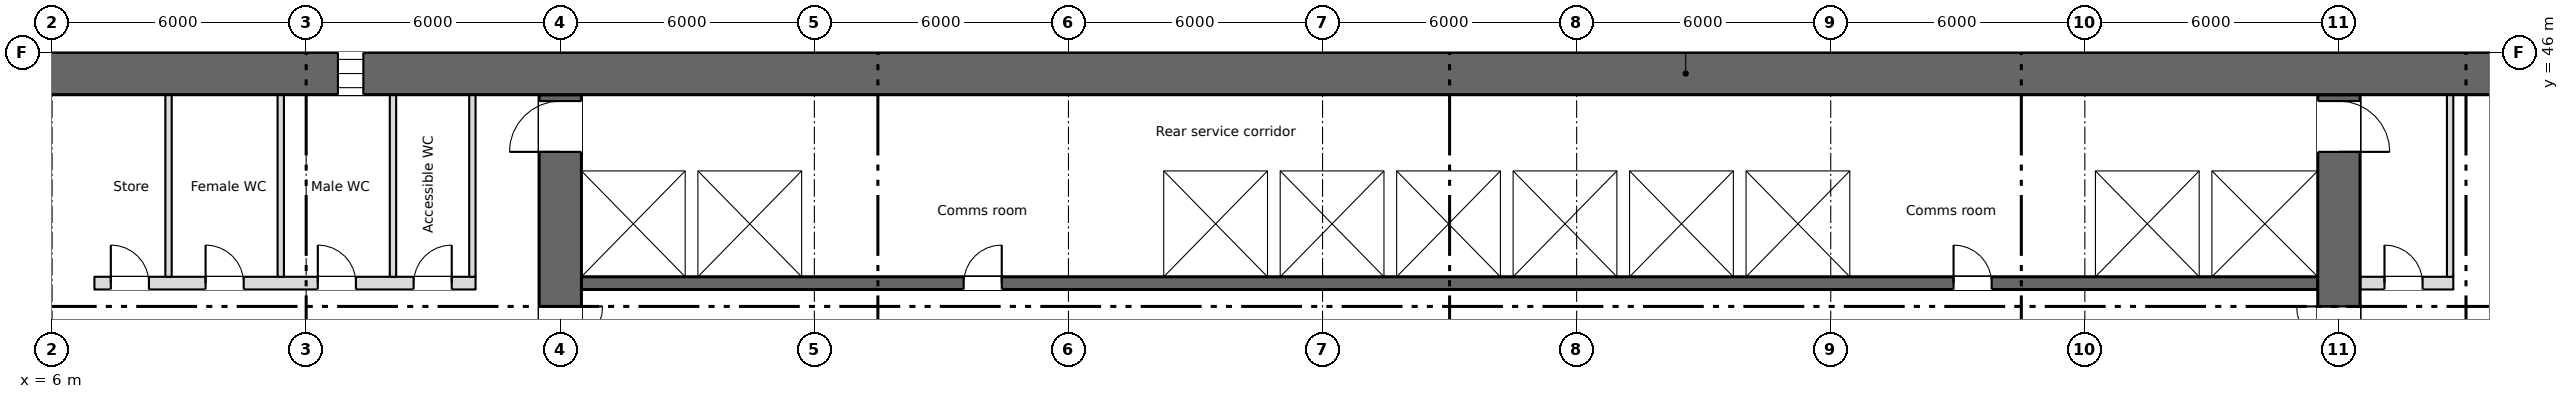
"""IFC4 building model, lengths in metres.
Left out: names, types, materials, properties, quantities, classifications, styles, units other than length and angle.
Written with IfcOpenShell. Run it as: python <this file> out.ifc"""

import sys

from ifc_helpers import new_model, si_unit, direction, frame, frame_2d, origin, place, context, subcontext, project, spatial, rectangle, extrude, element, fill, save


model = new_model("IFC4")
c1 = context("Model", 3, precision=1e-05, world=origin(), true_north=direction((0.0, 1.0)))
c2 = subcontext(c1, "Body", "Model", "MODEL_VIEW")
j1 = project(units=[si_unit("LENGTHUNIT", "METRE"), si_unit("PLANEANGLEUNIT", "RADIAN")], contexts=[c1])
p1 = place(None, origin())
s1 = spatial("IfcSite", under=j1, at=p1, CompositionType="ELEMENT")
p2 = place(p1, origin())
s2 = spatial("IfcBuilding", under=s1, at=p2, CompositionType="ELEMENT")
p3 = place(p2, frame((0.0, 0.0, 37.5)))
s3 = spatial("IfcBuildingStorey", under=s2, at=p3, CompositionType="ELEMENT", Elevation=37.5)
p4 = place(p3, frame((5.55, 45.5, 0.0), z_axis=(0.0, 0.0, 1.0), x_axis=(1.0, 0.0, 0.0)))
e1 = element("IfcWall", 1, at=p4, inside=s3, PredefinedType="SHEAR", context=c2, shape_type="SweptSolid", body=[
    extrude(rectangle(XDim=66.9, YDim=1.0, at=frame_2d((33.45, 0.0))), origin(), (0.0, 0.0, 1.0), 3.35),
])
p5 = place(p4, frame((7.2, 0.0, 0.6)))
e2 = element("IfcOpeningElement", 2, at=p5, cuts=e1, PredefinedType="OPENING", context=c2, shape_type="SweptSolid", body=[
    extrude(rectangle(XDim=0.6, YDim=2.4, at=frame_2d((0.3, 1.2))), frame((0.0, 0.51, 0.0), z_axis=(0.0, -1.0, 0.0), x_axis=(1.0, 0.0, 0.0)), (0.0, 0.0, 1.0), 1.02),
])
p6 = place(p4, frame((61.2, 0.0, 0.6)))
e3 = element("IfcOpeningElement", 3, at=p6, cuts=e1, PredefinedType="OPENING", context=c2, shape_type="SweptSolid", body=[
    extrude(rectangle(XDim=0.6, YDim=2.4, at=frame_2d((0.3, 1.2))), frame((0.0, 0.51, 0.0), z_axis=(0.0, -1.0, 0.0), x_axis=(1.0, 0.0, 0.0)), (0.0, 0.0, 1.0), 1.02),
])
p7 = place(p3, frame((6.85, 28.4, 0.0), z_axis=(0.0, 0.0, 1.0), x_axis=(0.0, 1.0, 0.0)))
e4 = element("IfcWall", 4, at=p7, inside=s3, PredefinedType="SHEAR", context=c2, shape_type="SweptSolid", body=[
    extrude(rectangle(XDim=16.6, YDim=0.3, at=frame_2d((8.3, 0.0))), origin(), (0.0, 0.0, 1.0), 3.35),
])
p8 = place(p3, frame((18.0, 28.4, 0.0), z_axis=(0.0, 0.0, 1.0), x_axis=(0.0, 1.0, 0.0)))
e5 = element("IfcWall", 5, at=p8, inside=s3, PredefinedType="SHEAR", context=c2, shape_type="SweptSolid", body=[
    extrude(rectangle(XDim=16.6, YDim=1.0, at=frame_2d((8.3, 0.0))), origin(), (0.0, 0.0, 1.0), 3.35),
])
p9 = place(p8, frame((9.6, 0.0, 0.0)))
e6 = element("IfcOpeningElement", 6, at=p9, cuts=e5, PredefinedType="OPENING", context=c2, shape_type="SweptSolid", body=[
    extrude(rectangle(XDim=2.0, YDim=2.1, at=frame_2d((1.0, 1.05))), frame((0.0, 0.51, 0.0), z_axis=(0.0, -1.0, 0.0), x_axis=(1.0, 0.0, 0.0)), (0.0, 0.0, 1.0), 1.02),
])
p10 = place(p8, frame((15.25, 0.0, 0.0)))
e7 = element("IfcOpeningElement", 7, at=p10, cuts=e5, PredefinedType="OPENING", context=c2, shape_type="SweptSolid", body=[
    extrude(rectangle(XDim=1.2, YDim=2.1, at=frame_2d((0.6, 1.05))), frame((0.0, 0.51, 0.0), z_axis=(0.0, -1.0, 0.0), x_axis=(1.0, 0.0, 0.0)), (0.0, 0.0, 1.0), 1.02),
])
p11 = place(p3, frame((60.0, 28.4, 0.0), z_axis=(0.0, 0.0, 1.0), x_axis=(0.0, 1.0, 0.0)))
e8 = element("IfcWall", 8, at=p11, inside=s3, PredefinedType="SHEAR", context=c2, shape_type="SweptSolid", body=[
    extrude(rectangle(XDim=16.6, YDim=1.0, at=frame_2d((8.3, 0.0))), origin(), (0.0, 0.0, 1.0), 3.35),
])
p12 = place(p11, frame((9.6, 0.0, 0.0)))
e9 = element("IfcOpeningElement", 9, at=p12, cuts=e8, PredefinedType="OPENING", context=c2, shape_type="SweptSolid", body=[
    extrude(rectangle(XDim=2.0, YDim=2.1, at=frame_2d((1.0, 1.05))), frame((0.0, 0.51, 0.0), z_axis=(0.0, -1.0, 0.0), x_axis=(1.0, 0.0, 0.0)), (0.0, 0.0, 1.0), 1.02),
])
p13 = place(p11, frame((15.25, 0.0, 0.0)))
e10 = element("IfcOpeningElement", 10, at=p13, cuts=e8, PredefinedType="OPENING", context=c2, shape_type="SweptSolid", body=[
    extrude(rectangle(XDim=1.2, YDim=2.1, at=frame_2d((0.6, 1.05))), frame((0.0, 0.51, 0.0), z_axis=(0.0, -1.0, 0.0), x_axis=(1.0, 0.0, 0.0)), (0.0, 0.0, 1.0), 1.02),
])
p14 = place(p3, frame((18.5, 40.55, 0.0), z_axis=(0.0, 0.0, 1.0), x_axis=(1.0, 0.0, 0.0)))
e11 = element("IfcWall", 11, at=p14, inside=s3, PredefinedType="SHEAR", context=c2, shape_type="SweptSolid", body=[
    extrude(rectangle(XDim=41.0, YDim=0.3, at=frame_2d((20.5, 0.0))), origin(), (0.0, 0.0, 1.0), 3.35),
])
p15 = place(p14, frame((9.025, 0.0, 0.0)))
e12 = element("IfcOpeningElement", 12, at=p15, cuts=e11, PredefinedType="OPENING", context=c2, shape_type="SweptSolid", body=[
    extrude(rectangle(XDim=0.9, YDim=2.1, at=frame_2d((0.45, 1.05))), frame((0.0, 0.16, 0.0), z_axis=(0.0, -1.0, 0.0), x_axis=(1.0, 0.0, 0.0)), (0.0, 0.0, 1.0), 0.32),
])
p16 = place(p14, frame((32.4, 0.0, 0.0)))
e13 = element("IfcOpeningElement", 13, at=p16, cuts=e11, PredefinedType="OPENING", context=c2, shape_type="SweptSolid", body=[
    extrude(rectangle(XDim=0.9, YDim=2.1, at=frame_2d((0.45, 1.05))), frame((0.0, 0.16, 0.0), z_axis=(0.0, -1.0, 0.0), x_axis=(1.0, 0.0, 0.0)), (0.0, 0.0, 1.0), 0.32),
])
p17 = place(p14, frame((14.425, 0.0, 0.0)))
e14 = element("IfcOpeningElement", 14, at=p17, cuts=e11, PredefinedType="OPENING", context=c2, shape_type="SweptSolid", body=[
    extrude(rectangle(XDim=1.1, YDim=2.1, at=frame_2d((0.55, 1.05))), frame((0.0, 0.16, 0.0), z_axis=(0.0, -1.0, 0.0), x_axis=(1.0, 0.0, 0.0)), (0.0, 0.0, 1.0), 0.32),
])
p18 = place(p14, frame((17.175, 0.0, 0.0)))
e15 = element("IfcOpeningElement", 15, at=p18, cuts=e11, PredefinedType="OPENING", context=c2, shape_type="SweptSolid", body=[
    extrude(rectangle(XDim=1.1, YDim=2.1, at=frame_2d((0.55, 1.05))), frame((0.0, 0.16, 0.0), z_axis=(0.0, -1.0, 0.0), x_axis=(1.0, 0.0, 0.0)), (0.0, 0.0, 1.0), 0.32),
])
p19 = place(p14, frame((19.925, 0.0, 0.0)))
e16 = element("IfcOpeningElement", 16, at=p19, cuts=e11, PredefinedType="OPENING", context=c2, shape_type="SweptSolid", body=[
    extrude(rectangle(XDim=1.1, YDim=2.1, at=frame_2d((0.55, 1.05))), frame((0.0, 0.16, 0.0), z_axis=(0.0, -1.0, 0.0), x_axis=(1.0, 0.0, 0.0)), (0.0, 0.0, 1.0), 0.32),
])
p20 = place(p14, frame((22.675, 0.0, 0.0)))
e17 = element("IfcOpeningElement", 17, at=p20, cuts=e11, PredefinedType="OPENING", context=c2, shape_type="SweptSolid", body=[
    extrude(rectangle(XDim=1.1, YDim=2.1, at=frame_2d((0.55, 1.05))), frame((0.0, 0.16, 0.0), z_axis=(0.0, -1.0, 0.0), x_axis=(1.0, 0.0, 0.0)), (0.0, 0.0, 1.0), 0.32),
])
p21 = place(p14, frame((36.375, 0.0, 0.0)))
e18 = element("IfcOpeningElement", 18, at=p21, cuts=e11, PredefinedType="OPENING", context=c2, shape_type="SweptSolid", body=[
    extrude(rectangle(XDim=1.2, YDim=2.1, at=frame_2d((0.6, 1.05))), frame((0.0, 0.16, 0.0), z_axis=(0.0, -1.0, 0.0), x_axis=(1.0, 0.0, 0.0)), (0.0, 0.0, 1.0), 0.32),
])
p22 = place(p14, frame((39.15, 0.0, 0.0)))
e19 = element("IfcOpeningElement", 19, at=p22, cuts=e11, PredefinedType="OPENING", context=c2, shape_type="SweptSolid", body=[
    extrude(rectangle(XDim=1.2, YDim=2.1, at=frame_2d((0.6, 1.05))), frame((0.0, 0.16, 0.0), z_axis=(0.0, -1.0, 0.0), x_axis=(1.0, 0.0, 0.0)), (0.0, 0.0, 1.0), 0.32),
])
p23 = place(p3, frame((18.5, 43.35, 0.0), z_axis=(0.0, 0.0, 1.0), x_axis=(1.0, 0.0, 0.0)))
e20 = element("IfcWall", 20, at=p23, inside=s3, PredefinedType="SHEAR", context=c2, shape_type="SweptSolid", body=[
    extrude(rectangle(XDim=41.0, YDim=0.3, at=frame_2d((20.5, 0.0))), origin(), (0.0, 0.0, 1.0), 3.35),
])
p24 = place(p3, frame((7.0, 40.55, 0.0), z_axis=(0.0, 0.0, 1.0), x_axis=(1.0, 0.0, 0.0)))
e21 = element("IfcWall", 21, at=p24, inside=s3, PredefinedType="PARTITIONING", context=c2, shape_type="SweptSolid", body=[
    extrude(rectangle(XDim=9.0, YDim=0.3, at=frame_2d((4.5, 0.0))), origin(), (0.0, 0.0, 1.0), 3.35),
])
p25 = place(p24, frame((0.387, 0.0, 0.0)))
e22 = element("IfcOpeningElement", 22, at=p25, cuts=e21, PredefinedType="OPENING", context=c2, shape_type="SweptSolid", body=[
    extrude(rectangle(XDim=0.9, YDim=2.1, at=frame_2d((0.45, 1.05))), frame((0.0, 0.16, 0.0), z_axis=(0.0, -1.0, 0.0), x_axis=(1.0, 0.0, 0.0)), (0.0, 0.0, 1.0), 0.32),
])
p26 = place(p24, frame((2.625, 0.0, 0.0)))
e23 = element("IfcOpeningElement", 23, at=p26, cuts=e21, PredefinedType="OPENING", context=c2, shape_type="SweptSolid", body=[
    extrude(rectangle(XDim=0.9, YDim=2.1, at=frame_2d((0.45, 1.05))), frame((0.0, 0.16, 0.0), z_axis=(0.0, -1.0, 0.0), x_axis=(1.0, 0.0, 0.0)), (0.0, 0.0, 1.0), 0.32),
])
p27 = place(p24, frame((5.275, 0.0, 0.0)))
e24 = element("IfcOpeningElement", 24, at=p27, cuts=e21, PredefinedType="OPENING", context=c2, shape_type="SweptSolid", body=[
    extrude(rectangle(XDim=0.9, YDim=2.1, at=frame_2d((0.45, 1.05))), frame((0.0, 0.16, 0.0), z_axis=(0.0, -1.0, 0.0), x_axis=(1.0, 0.0, 0.0)), (0.0, 0.0, 1.0), 0.32),
])
p28 = place(p24, frame((7.538, 0.0, 0.0)))
e25 = element("IfcOpeningElement", 25, at=p28, cuts=e21, PredefinedType="OPENING", context=c2, shape_type="SweptSolid", body=[
    extrude(rectangle(XDim=0.9, YDim=2.1, at=frame_2d((0.45, 1.05))), frame((0.0, 0.16, 0.0), z_axis=(0.0, -1.0, 0.0), x_axis=(1.0, 0.0, 0.0)), (0.0, 0.0, 1.0), 0.32),
])
p29 = place(p3, frame((60.5, 40.55, 0.0), z_axis=(0.0, 0.0, 1.0), x_axis=(1.0, 0.0, 0.0)))
e26 = element("IfcWall", 26, at=p29, inside=s3, PredefinedType="PARTITIONING", context=c2, shape_type="SweptSolid", body=[
    extrude(rectangle(XDim=2.2, YDim=0.3, at=frame_2d((1.1, 0.0))), origin(), (0.0, 0.0, 1.0), 3.35),
])
p30 = place(p29, frame((0.575, 0.0, 0.0)))
e27 = element("IfcOpeningElement", 27, at=p30, cuts=e26, PredefinedType="OPENING", context=c2, shape_type="SweptSolid", body=[
    extrude(rectangle(XDim=0.9, YDim=2.1, at=frame_2d((0.45, 1.05))), frame((0.0, 0.16, 0.0), z_axis=(0.0, -1.0, 0.0), x_axis=(1.0, 0.0, 0.0)), (0.0, 0.0, 1.0), 0.32),
])
for number, where, z_axis, x_axis in (
    (28, (21.1, 40.7, 0.0), (0.0, 0.0, 1.0), (0.0, 1.0, 0.0)),
    (29, (23.85, 40.7, 0.0), (0.0, 0.0, 1.0), (0.0, 1.0, 0.0)),
    (30, (32.1, 40.7, 0.0), (0.0, 0.0, 1.0), (0.0, 1.0, 0.0)),
    (31, (34.85, 40.7, 0.0), (0.0, 0.0, 1.0), (0.0, 1.0, 0.0)),
    (32, (37.6, 40.7, 0.0), (0.0, 0.0, 1.0), (0.0, 1.0, 0.0)),
    (33, (40.35, 40.7, 0.0), (0.0, 0.0, 1.0), (0.0, 1.0, 0.0)),
    (34, (43.1, 40.7, 0.0), (0.0, 0.0, 1.0), (0.0, 1.0, 0.0)),
    (35, (45.85, 40.7, 0.0), (0.0, 0.0, 1.0), (0.0, 1.0, 0.0)),
    (36, (48.6, 40.7, 0.0), (0.0, 0.0, 1.0), (0.0, 1.0, 0.0)),
    (37, (54.1, 40.7, 0.0), (0.0, 0.0, 1.0), (0.0, 1.0, 0.0)),
    (38, (56.85, 40.7, 0.0), (0.0, 0.0, 1.0), (0.0, 1.0, 0.0)),
):
    element("IfcWall", number, at=place(p3, frame(where, z_axis=z_axis, x_axis=x_axis)), inside=s3, PredefinedType="SHEAR", context=c2, shape_type="SweptSolid", body=[
        extrude(rectangle(XDim=2.5, YDim=0.3, at=frame_2d((1.25, 0.0))), origin(), (0.0, 0.0, 1.0), 3.35),
    ])
for number, where, z_axis, x_axis in (
    (39, (15.925, 40.7, 0.0), (0.0, 0.0, 1.0), (0.0, 1.0, 0.0)),
    (40, (62.625, 40.7, 0.0), (0.0, 0.0, 1.0), (0.0, 1.0, 0.0)),
    (41, (8.75, 40.7, 0.0), (0.0, 0.0, 1.0), (0.0, 1.0, 0.0)),
    (42, (11.4, 40.7, 0.0), (0.0, 0.0, 1.0), (0.0, 1.0, 0.0)),
    (43, (14.05, 40.7, 0.0), (0.0, 0.0, 1.0), (0.0, 1.0, 0.0)),
):
    element("IfcWall", number, at=place(p3, frame(where, z_axis=z_axis, x_axis=x_axis)), inside=s3, PredefinedType="PARTITIONING", context=c2, shape_type="SweptSolid", body=[
        extrude(rectangle(XDim=4.3, YDim=0.15, at=frame_2d((2.15, 0.0))), origin(), (0.0, 0.0, 1.0), 3.35),
    ])
p31 = place(p5, origin())
e44 = element("IfcWindow", 44, at=p31, inside=s3, PartitioningType="SINGLE_PANEL", PredefinedType="WINDOW", context=c2, shape_type="SweptSolid", body=[
    extrude(rectangle(XDim=0.6, YDim=2.4, at=frame_2d((0.3, 1.2))), frame((0.0, 0.03, 0.0), z_axis=(0.0, -1.0, 0.0), x_axis=(1.0, 0.0, 0.0)), (0.0, 0.0, 1.0), 0.06),
])
fill(e2, e44)
p32 = place(p25, origin())
e45 = element("IfcDoor", 45, at=p32, inside=s3, OperationType="SINGLE_SWING_LEFT", PredefinedType="DOOR", context=c2, shape_type="SweptSolid", body=[
    extrude(rectangle(XDim=0.9, YDim=2.1, at=frame_2d((0.45, 1.05))), frame((0.0, 0.025, 0.0), z_axis=(0.0, -1.0, 0.0), x_axis=(1.0, 0.0, 0.0)), (0.0, 0.0, 1.0), 0.05),
])
fill(e22, e45)
p33 = place(p26, origin())
e46 = element("IfcDoor", 46, at=p33, inside=s3, OperationType="SINGLE_SWING_LEFT", PredefinedType="DOOR", context=c2, shape_type="SweptSolid", body=[
    extrude(rectangle(XDim=0.9, YDim=2.1, at=frame_2d((0.45, 1.05))), frame((0.0, 0.025, 0.0), z_axis=(0.0, -1.0, 0.0), x_axis=(1.0, 0.0, 0.0)), (0.0, 0.0, 1.0), 0.05),
])
fill(e23, e46)
p34 = place(p27, origin())
e47 = element("IfcDoor", 47, at=p34, inside=s3, OperationType="SINGLE_SWING_LEFT", PredefinedType="DOOR", context=c2, shape_type="SweptSolid", body=[
    extrude(rectangle(XDim=0.9, YDim=2.1, at=frame_2d((0.45, 1.05))), frame((0.0, 0.025, 0.0), z_axis=(0.0, -1.0, 0.0), x_axis=(1.0, 0.0, 0.0)), (0.0, 0.0, 1.0), 0.05),
])
fill(e24, e47)
p35 = place(p28, origin())
e48 = element("IfcDoor", 48, at=p35, inside=s3, OperationType="SINGLE_SWING_RIGHT", PredefinedType="DOOR", context=c2, shape_type="SweptSolid", body=[
    extrude(rectangle(XDim=0.9, YDim=2.1, at=frame_2d((0.45, 1.05))), frame((0.0, 0.025, 0.0), z_axis=(0.0, -1.0, 0.0), x_axis=(1.0, 0.0, 0.0)), (0.0, 0.0, 1.0), 0.05),
])
fill(e25, e48)
p36 = place(p30, origin())
e49 = element("IfcDoor", 49, at=p36, inside=s3, OperationType="SINGLE_SWING_LEFT", PredefinedType="DOOR", context=c2, shape_type="SweptSolid", body=[
    extrude(rectangle(XDim=0.9, YDim=2.1, at=frame_2d((0.45, 1.05))), frame((0.0, 0.025, 0.0), z_axis=(0.0, -1.0, 0.0), x_axis=(1.0, 0.0, 0.0)), (0.0, 0.0, 1.0), 0.05),
])
fill(e27, e49)
p37 = place(p15, origin())
e50 = element("IfcDoor", 50, at=p37, inside=s3, OperationType="SINGLE_SWING_RIGHT", PredefinedType="DOOR", context=c2, shape_type="SweptSolid", body=[
    extrude(rectangle(XDim=0.9, YDim=2.1, at=frame_2d((0.45, 1.05))), frame((0.0, 0.025, 0.0), z_axis=(0.0, -1.0, 0.0), x_axis=(1.0, 0.0, 0.0)), (0.0, 0.0, 1.0), 0.05),
])
fill(e12, e50)
p38 = place(p16, origin())
e51 = element("IfcDoor", 51, at=p38, inside=s3, OperationType="SINGLE_SWING_LEFT", PredefinedType="DOOR", context=c2, shape_type="SweptSolid", body=[
    extrude(rectangle(XDim=0.9, YDim=2.1, at=frame_2d((0.45, 1.05))), frame((0.0, 0.025, 0.0), z_axis=(0.0, -1.0, 0.0), x_axis=(1.0, 0.0, 0.0)), (0.0, 0.0, 1.0), 0.05),
])
fill(e13, e51)
p39 = place(p17, origin())
e52 = element("IfcDoor", 52, at=p39, inside=s3, OperationType="SLIDING_TO_LEFT", PredefinedType="DOOR", context=c2, shape_type="SweptSolid", body=[
    extrude(rectangle(XDim=1.1, YDim=2.1, at=frame_2d((0.55, 1.05))), frame((0.0, 0.025, 0.0), z_axis=(0.0, -1.0, 0.0), x_axis=(1.0, 0.0, 0.0)), (0.0, 0.0, 1.0), 0.05),
])
fill(e14, e52)
p40 = place(p18, origin())
e53 = element("IfcDoor", 53, at=p40, inside=s3, OperationType="SLIDING_TO_LEFT", PredefinedType="DOOR", context=c2, shape_type="SweptSolid", body=[
    extrude(rectangle(XDim=1.1, YDim=2.1, at=frame_2d((0.55, 1.05))), frame((0.0, 0.025, 0.0), z_axis=(0.0, -1.0, 0.0), x_axis=(1.0, 0.0, 0.0)), (0.0, 0.0, 1.0), 0.05),
])
fill(e15, e53)
p41 = place(p19, origin())
e54 = element("IfcDoor", 54, at=p41, inside=s3, OperationType="SLIDING_TO_LEFT", PredefinedType="DOOR", context=c2, shape_type="SweptSolid", body=[
    extrude(rectangle(XDim=1.1, YDim=2.1, at=frame_2d((0.55, 1.05))), frame((0.0, 0.025, 0.0), z_axis=(0.0, -1.0, 0.0), x_axis=(1.0, 0.0, 0.0)), (0.0, 0.0, 1.0), 0.05),
])
fill(e16, e54)
p42 = place(p20, origin())
e55 = element("IfcDoor", 55, at=p42, inside=s3, OperationType="SLIDING_TO_LEFT", PredefinedType="DOOR", context=c2, shape_type="SweptSolid", body=[
    extrude(rectangle(XDim=1.1, YDim=2.1, at=frame_2d((0.55, 1.05))), frame((0.0, 0.025, 0.0), z_axis=(0.0, -1.0, 0.0), x_axis=(1.0, 0.0, 0.0)), (0.0, 0.0, 1.0), 0.05),
])
fill(e17, e55)
p43 = place(p21, origin())
e56 = element("IfcDoor", 56, at=p43, inside=s3, OperationType="SLIDING_TO_LEFT", PredefinedType="DOOR", context=c2, shape_type="SweptSolid", body=[
    extrude(rectangle(XDim=1.2, YDim=2.1, at=frame_2d((0.6, 1.05))), frame((0.0, 0.025, 0.0), z_axis=(0.0, -1.0, 0.0), x_axis=(1.0, 0.0, 0.0)), (0.0, 0.0, 1.0), 0.05),
])
fill(e18, e56)
p44 = place(p22, origin())
e57 = element("IfcDoor", 57, at=p44, inside=s3, OperationType="SLIDING_TO_LEFT", PredefinedType="DOOR", context=c2, shape_type="SweptSolid", body=[
    extrude(rectangle(XDim=1.2, YDim=2.1, at=frame_2d((0.6, 1.05))), frame((0.0, 0.025, 0.0), z_axis=(0.0, -1.0, 0.0), x_axis=(1.0, 0.0, 0.0)), (0.0, 0.0, 1.0), 0.05),
])
fill(e19, e57)
p45 = place(p9, origin())
e58 = element("IfcDoor", 58, at=p45, inside=s3, OperationType="DOUBLE_DOOR_SINGLE_SWING", PredefinedType="DOOR", context=c2, shape_type="SweptSolid", body=[
    extrude(rectangle(XDim=2.0, YDim=2.1, at=frame_2d((1.0, 1.05))), frame((0.0, 0.025, 0.0), z_axis=(0.0, -1.0, 0.0), x_axis=(1.0, 0.0, 0.0)), (0.0, 0.0, 1.0), 0.05),
])
fill(e6, e58)
p46 = place(p12, origin())
e59 = element("IfcDoor", 59, at=p46, inside=s3, OperationType="DOUBLE_DOOR_SINGLE_SWING", PredefinedType="DOOR", context=c2, shape_type="SweptSolid", body=[
    extrude(rectangle(XDim=2.0, YDim=2.1, at=frame_2d((1.0, 1.05))), frame((0.0, 0.025, 0.0), z_axis=(0.0, -1.0, 0.0), x_axis=(1.0, 0.0, 0.0)), (0.0, 0.0, 1.0), 0.05),
])
fill(e9, e59)
p47 = place(p10, origin())
e60 = element("IfcDoor", 60, at=p47, inside=s3, OperationType="SINGLE_SWING_LEFT", PredefinedType="DOOR", context=c2, shape_type="SweptSolid", body=[
    extrude(rectangle(XDim=1.2, YDim=2.1, at=frame_2d((0.6, 1.05))), frame((0.0, 0.025, 0.0), z_axis=(0.0, -1.0, 0.0), x_axis=(1.0, 0.0, 0.0)), (0.0, 0.0, 1.0), 0.05),
])
fill(e7, e60)
p48 = place(p13, origin())
e61 = element("IfcDoor", 61, at=p48, inside=s3, OperationType="SINGLE_SWING_LEFT", PredefinedType="DOOR", context=c2, shape_type="SweptSolid", body=[
    extrude(rectangle(XDim=1.2, YDim=2.1, at=frame_2d((0.6, 1.05))), frame((0.0, 0.025, 0.0), z_axis=(0.0, -1.0, 0.0), x_axis=(1.0, 0.0, 0.0)), (0.0, 0.0, 1.0), 0.05),
])
fill(e10, e61)
save(model, sys.argv[1])
